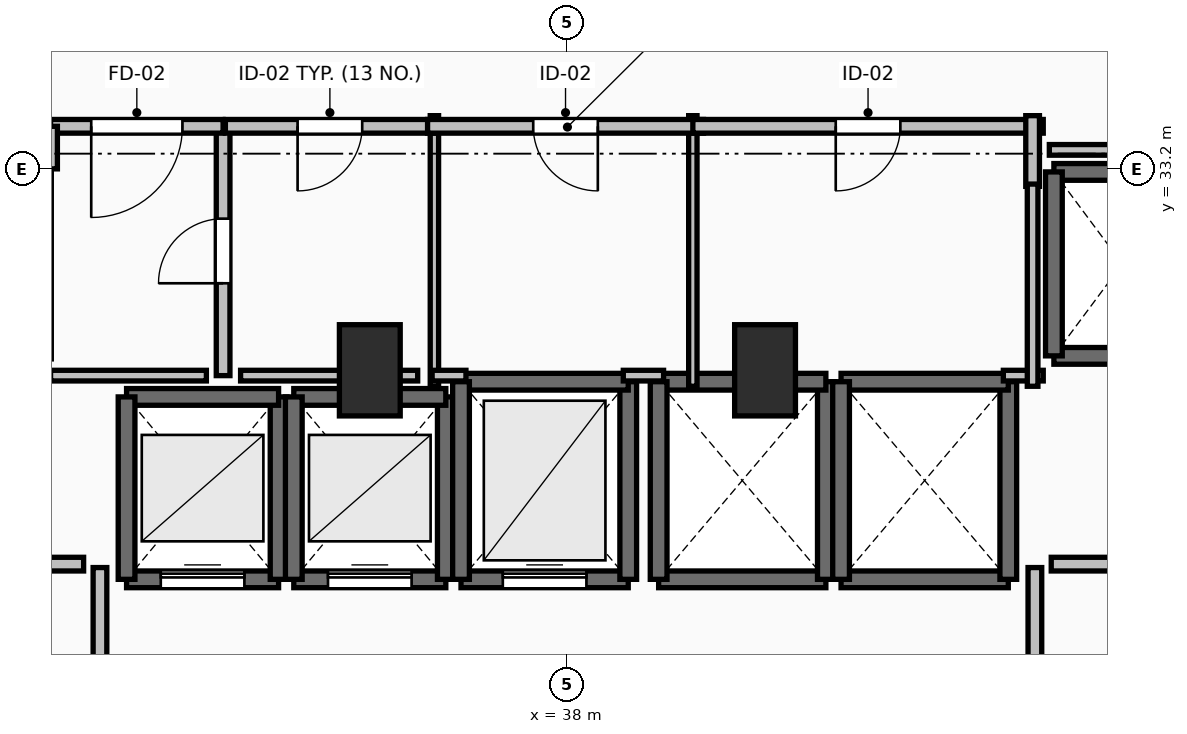
"""IFC4 building model, lengths in metres.
Left out: names, types, materials, properties, quantities, classifications, styles, units other than length and angle.
Written with IfcOpenShell. Run it as: python <this file> out.ifc"""

import sys

from ifc_helpers import new_model, si_unit, direction, frame, frame_2d, origin, origin_2d, place, context, subcontext, project, spatial, rectangle, extrude, element, fill, save


model = new_model("IFC4")
c1 = context("Model", 3, precision=1e-05, world=origin(), true_north=direction((0.0, 1.0)))
c2 = subcontext(c1, "Body", "Model", "MODEL_VIEW")
j1 = project(units=[si_unit("LENGTHUNIT", "METRE"), si_unit("PLANEANGLEUNIT", "RADIAN")], contexts=[c1])
p1 = place(None, origin())
s1 = spatial("IfcSite", under=j1, at=p1, CompositionType="ELEMENT")
p2 = place(p1, origin())
s2 = spatial("IfcBuilding", under=s1, at=p2, CompositionType="ELEMENT")
p3 = place(p2, frame((0.0, 0.0, 82.3)))
s3 = spatial("IfcBuildingStorey", under=s2, at=p3, CompositionType="ELEMENT", Elevation=82.3)
for number, where, z_axis, x_axis in (
    (1, (35.4, 30.55, 0.0), (0.0, 0.0, 1.0), (1.0, 0.0, 0.0)),
    (2, (40.6, 30.55, 0.0), (0.0, 0.0, 1.0), (1.0, 0.0, 0.0)),
):
    element("IfcColumn", number, at=place(p3, frame(where, z_axis=z_axis, x_axis=x_axis)), inside=s3, PredefinedType="PILASTER", context=c2, shape_type="SweptSolid", body=[
        extrude(rectangle(XDim=0.8, YDim=1.2, at=origin_2d()), origin(), (0.0, 0.0, 1.0), 3.5),
    ])
p4 = place(p3, frame((32.2, 27.8, 0.0), z_axis=(0.0, 0.0, 1.0), x_axis=(1.0, 0.0, 0.0)))
e3 = element("IfcWall", 3, at=p4, inside=s3, PredefinedType="SOLIDWALL", context=c2, shape_type="SweptSolid", body=[
    extrude(rectangle(XDim=2.0, YDim=0.22, at=frame_2d((1.0, 0.0))), origin(), (0.0, 0.0, 1.0), 3.24),
])
p5 = place(p4, frame((0.45, 0.0, 0.0)))
e4 = element("IfcOpeningElement", 4, at=p5, cuts=e3, PredefinedType="OPENING", context=c2, shape_type="SweptSolid", body=[
    extrude(rectangle(XDim=1.1, YDim=2.2, at=frame_2d((0.55, 1.1))), frame((0.0, 0.125, 0.0), z_axis=(0.0, -1.0, 0.0), x_axis=(1.0, 0.0, 0.0)), (0.0, 0.0, 1.0), 0.25),
])
p6 = place(p3, frame((34.2, 27.8, 0.0), z_axis=(0.0, 0.0, 1.0), x_axis=(0.0, 1.0, 0.0)))
e5 = element("IfcWall", 5, at=p6, inside=s3, PredefinedType="SOLIDWALL", context=c2, shape_type="SweptSolid", body=[
    extrude(rectangle(XDim=2.4, YDim=0.22, at=frame_2d((1.2, 0.0))), origin(), (0.0, 0.0, 1.0), 3.24),
])
p7 = place(p3, frame((34.2, 30.2, 0.0), z_axis=(0.0, 0.0, 1.0), x_axis=(-1.0, 0.0, 0.0)))
e6 = element("IfcWall", 6, at=p7, inside=s3, PredefinedType="SOLIDWALL", context=c2, shape_type="SweptSolid", body=[
    extrude(rectangle(XDim=2.0, YDim=0.22, at=frame_2d((1.0, 0.0))), origin(), (0.0, 0.0, 1.0), 3.24),
])
p8 = place(p3, frame((32.2, 30.2, 0.0), z_axis=(0.0, 0.0, 1.0), x_axis=(0.0, -1.0, 0.0)))
e7 = element("IfcWall", 7, at=p8, inside=s3, PredefinedType="SOLIDWALL", context=c2, shape_type="SweptSolid", body=[
    extrude(rectangle(XDim=2.4, YDim=0.22, at=frame_2d((1.2, 0.0))), origin(), (0.0, 0.0, 1.0), 3.24),
])
p9 = place(p3, frame((34.4, 27.8, 0.0), z_axis=(0.0, 0.0, 1.0), x_axis=(1.0, 0.0, 0.0)))
e8 = element("IfcWall", 8, at=p9, inside=s3, PredefinedType="SOLIDWALL", context=c2, shape_type="SweptSolid", body=[
    extrude(rectangle(XDim=2.0, YDim=0.22, at=frame_2d((1.0, 0.0))), origin(), (0.0, 0.0, 1.0), 3.24),
])
p10 = place(p9, frame((0.45, 0.0, 0.0)))
e9 = element("IfcOpeningElement", 9, at=p10, cuts=e8, PredefinedType="OPENING", context=c2, shape_type="SweptSolid", body=[
    extrude(rectangle(XDim=1.1, YDim=2.2, at=frame_2d((0.55, 1.1))), frame((0.0, 0.125, 0.0), z_axis=(0.0, -1.0, 0.0), x_axis=(1.0, 0.0, 0.0)), (0.0, 0.0, 1.0), 0.25),
])
p11 = place(p3, frame((36.4, 27.8, 0.0), z_axis=(0.0, 0.0, 1.0), x_axis=(0.0, 1.0, 0.0)))
e10 = element("IfcWall", 10, at=p11, inside=s3, PredefinedType="SOLIDWALL", context=c2, shape_type="SweptSolid", body=[
    extrude(rectangle(XDim=2.4, YDim=0.22, at=frame_2d((1.2, 0.0))), origin(), (0.0, 0.0, 1.0), 3.24),
])
p12 = place(p3, frame((36.4, 30.2, 0.0), z_axis=(0.0, 0.0, 1.0), x_axis=(-1.0, 0.0, 0.0)))
e11 = element("IfcWall", 11, at=p12, inside=s3, PredefinedType="SOLIDWALL", context=c2, shape_type="SweptSolid", body=[
    extrude(rectangle(XDim=2.0, YDim=0.22, at=frame_2d((1.0, 0.0))), origin(), (0.0, 0.0, 1.0), 3.24),
])
p13 = place(p3, frame((34.4, 30.2, 0.0), z_axis=(0.0, 0.0, 1.0), x_axis=(0.0, -1.0, 0.0)))
e12 = element("IfcWall", 12, at=p13, inside=s3, PredefinedType="SOLIDWALL", context=c2, shape_type="SweptSolid", body=[
    extrude(rectangle(XDim=2.4, YDim=0.22, at=frame_2d((1.2, 0.0))), origin(), (0.0, 0.0, 1.0), 3.24),
])
p14 = place(p3, frame((36.6, 27.8, 0.0), z_axis=(0.0, 0.0, 1.0), x_axis=(1.0, 0.0, 0.0)))
e13 = element("IfcWall", 13, at=p14, inside=s3, PredefinedType="SOLIDWALL", context=c2, shape_type="SweptSolid", body=[
    extrude(rectangle(XDim=2.2, YDim=0.22, at=frame_2d((1.1, 0.0))), origin(), (0.0, 0.0, 1.0), 3.24),
])
p15 = place(p14, frame((0.55, 0.0, 0.0)))
e14 = element("IfcOpeningElement", 14, at=p15, cuts=e13, PredefinedType="OPENING", context=c2, shape_type="SweptSolid", body=[
    extrude(rectangle(XDim=1.1, YDim=2.2, at=frame_2d((0.55, 1.1))), frame((0.0, 0.125, 0.0), z_axis=(0.0, -1.0, 0.0), x_axis=(1.0, 0.0, 0.0)), (0.0, 0.0, 1.0), 0.25),
])
p16 = place(p3, frame((38.8, 27.8, 0.0), z_axis=(0.0, 0.0, 1.0), x_axis=(0.0, 1.0, 0.0)))
e15 = element("IfcWall", 15, at=p16, inside=s3, PredefinedType="SOLIDWALL", context=c2, shape_type="SweptSolid", body=[
    extrude(rectangle(XDim=2.6, YDim=0.22, at=frame_2d((1.3, 0.0))), origin(), (0.0, 0.0, 1.0), 3.24),
])
p17 = place(p3, frame((38.8, 30.4, 0.0), z_axis=(0.0, 0.0, 1.0), x_axis=(-1.0, 0.0, 0.0)))
e16 = element("IfcWall", 16, at=p17, inside=s3, PredefinedType="SOLIDWALL", context=c2, shape_type="SweptSolid", body=[
    extrude(rectangle(XDim=2.2, YDim=0.22, at=frame_2d((1.1, 0.0))), origin(), (0.0, 0.0, 1.0), 3.24),
])
p18 = place(p3, frame((36.6, 30.4, 0.0), z_axis=(0.0, 0.0, 1.0), x_axis=(0.0, -1.0, 0.0)))
e17 = element("IfcWall", 17, at=p18, inside=s3, PredefinedType="SOLIDWALL", context=c2, shape_type="SweptSolid", body=[
    extrude(rectangle(XDim=2.6, YDim=0.22, at=frame_2d((1.3, 0.0))), origin(), (0.0, 0.0, 1.0), 3.24),
])
p19 = place(p3, frame((39.2, 27.8, 0.0), z_axis=(0.0, 0.0, 1.0), x_axis=(1.0, 0.0, 0.0)))
e18 = element("IfcWall", 18, at=p19, inside=s3, PredefinedType="SOLIDWALL", context=c2, shape_type="SweptSolid", body=[
    extrude(rectangle(XDim=2.2, YDim=0.22, at=frame_2d((1.1, 0.0))), origin(), (0.0, 0.0, 1.0), 3.24),
])
p20 = place(p3, frame((41.4, 27.8, 0.0), z_axis=(0.0, 0.0, 1.0), x_axis=(0.0, 1.0, 0.0)))
e19 = element("IfcWall", 19, at=p20, inside=s3, PredefinedType="SOLIDWALL", context=c2, shape_type="SweptSolid", body=[
    extrude(rectangle(XDim=2.6, YDim=0.22, at=frame_2d((1.3, 0.0))), origin(), (0.0, 0.0, 1.0), 3.24),
])
p21 = place(p3, frame((41.4, 30.4, 0.0), z_axis=(0.0, 0.0, 1.0), x_axis=(-1.0, 0.0, 0.0)))
e20 = element("IfcWall", 20, at=p21, inside=s3, PredefinedType="SOLIDWALL", context=c2, shape_type="SweptSolid", body=[
    extrude(rectangle(XDim=2.2, YDim=0.22, at=frame_2d((1.1, 0.0))), origin(), (0.0, 0.0, 1.0), 3.24),
])
p22 = place(p3, frame((39.2, 30.4, 0.0), z_axis=(0.0, 0.0, 1.0), x_axis=(0.0, -1.0, 0.0)))
e21 = element("IfcWall", 21, at=p22, inside=s3, PredefinedType="SOLIDWALL", context=c2, shape_type="SweptSolid", body=[
    extrude(rectangle(XDim=2.6, YDim=0.22, at=frame_2d((1.3, 0.0))), origin(), (0.0, 0.0, 1.0), 3.24),
])
p23 = place(p3, frame((41.6, 27.8, 0.0), z_axis=(0.0, 0.0, 1.0), x_axis=(1.0, 0.0, 0.0)))
e22 = element("IfcWall", 22, at=p23, inside=s3, PredefinedType="SOLIDWALL", context=c2, shape_type="SweptSolid", body=[
    extrude(rectangle(XDim=2.2, YDim=0.22, at=frame_2d((1.1, 0.0))), origin(), (0.0, 0.0, 1.0), 3.24),
])
p24 = place(p3, frame((43.8, 27.8, 0.0), z_axis=(0.0, 0.0, 1.0), x_axis=(0.0, 1.0, 0.0)))
e23 = element("IfcWall", 23, at=p24, inside=s3, PredefinedType="SOLIDWALL", context=c2, shape_type="SweptSolid", body=[
    extrude(rectangle(XDim=2.6, YDim=0.22, at=frame_2d((1.3, 0.0))), origin(), (0.0, 0.0, 1.0), 3.24),
])
p25 = place(p3, frame((43.8, 30.4, 0.0), z_axis=(0.0, 0.0, 1.0), x_axis=(-1.0, 0.0, 0.0)))
e24 = element("IfcWall", 24, at=p25, inside=s3, PredefinedType="SOLIDWALL", context=c2, shape_type="SweptSolid", body=[
    extrude(rectangle(XDim=2.2, YDim=0.22, at=frame_2d((1.1, 0.0))), origin(), (0.0, 0.0, 1.0), 3.24),
])
p26 = place(p3, frame((41.6, 30.4, 0.0), z_axis=(0.0, 0.0, 1.0), x_axis=(0.0, -1.0, 0.0)))
e25 = element("IfcWall", 25, at=p26, inside=s3, PredefinedType="SOLIDWALL", context=c2, shape_type="SweptSolid", body=[
    extrude(rectangle(XDim=2.6, YDim=0.22, at=frame_2d((1.3, 0.0))), origin(), (0.0, 0.0, 1.0), 3.24),
])
for number, where, z_axis, x_axis in (
    (26, (44.4, 30.74, 0.0), (0.0, 0.0, 1.0), (1.0, 0.0, 0.0)),
    (27, (46.2, 33.16, 0.0), (0.0, 0.0, 1.0), (-1.0, 0.0, 0.0)),
):
    element("IfcWall", number, at=place(p3, frame(where, z_axis=z_axis, x_axis=x_axis)), inside=s3, PredefinedType="SOLIDWALL", context=c2, shape_type="SweptSolid", body=[
        extrude(rectangle(XDim=1.8, YDim=0.22, at=frame_2d((0.9, 0.0))), origin(), (0.0, 0.0, 1.0), 3.24),
    ])
p27 = place(p3, frame((44.4, 33.16, 0.0), z_axis=(0.0, 0.0, 1.0), x_axis=(0.0, -1.0, 0.0)))
e28 = element("IfcWall", 28, at=p27, inside=s3, PredefinedType="SOLIDWALL", context=c2, shape_type="SweptSolid", body=[
    extrude(rectangle(XDim=2.42, YDim=0.22, at=frame_2d((1.21, 0.0))), origin(), (0.0, 0.0, 1.0), 3.24),
])
p28 = place(p3, frame((31.85, 24.045, 0.0), z_axis=(0.0, 0.0, 1.0), x_axis=(0.0, 1.0, 0.0)))
e29 = element("IfcWall", 29, at=p28, inside=s3, PredefinedType="PARTITIONING", context=c2, shape_type="SweptSolid", body=[
    extrude(rectangle(XDim=3.91, YDim=0.18, at=frame_2d((1.955, 0.0))), origin(), (0.0, 0.0, 1.0), 3.24),
])
p29 = place(p28, frame((1.355, 0.0, 0.0)))
e30 = element("IfcOpeningElement", 30, at=p29, cuts=e29, PredefinedType="OPENING", context=c2, shape_type="SweptSolid", body=[
    extrude(rectangle(XDim=1.2, YDim=2.15, at=frame_2d((0.6, 1.075))), frame((0.0, 0.105, 0.0), z_axis=(0.0, -1.0, 0.0), x_axis=(1.0, 0.0, 0.0)), (0.0, 0.0, 1.0), 0.21),
])
p30 = place(p3, frame((44.15, 27.955, 0.0), z_axis=(0.0, 0.0, 1.0), x_axis=(0.0, -1.0, 0.0)))
e31 = element("IfcWall", 31, at=p30, inside=s3, PredefinedType="PARTITIONING", context=c2, shape_type="SweptSolid", body=[
    extrude(rectangle(XDim=3.91, YDim=0.18, at=frame_2d((1.955, 0.0))), origin(), (0.0, 0.0, 1.0), 3.24),
])
p31 = place(p30, frame((1.355, 0.0, 0.0)))
e32 = element("IfcOpeningElement", 32, at=p31, cuts=e31, PredefinedType="OPENING", context=c2, shape_type="SweptSolid", body=[
    extrude(rectangle(XDim=1.2, YDim=2.15, at=frame_2d((0.6, 1.075))), frame((0.0, 0.105, 0.0), z_axis=(0.0, -1.0, 0.0), x_axis=(1.0, 0.0, 0.0)), (0.0, 0.0, 1.0), 0.21),
])
p32 = place(p3, frame((33.47, 30.48, 0.0), z_axis=(0.0, 0.0, 1.0), x_axis=(0.0, 1.0, 0.0)))
e33 = element("IfcWall", 33, at=p32, inside=s3, PredefinedType="PARTITIONING", context=c2, shape_type="SweptSolid", body=[
    extrude(rectangle(XDim=3.28, YDim=0.18, at=frame_2d((1.64, 0.0))), origin(), (0.0, 0.0, 1.0), 3.24),
])
p33 = place(p32, frame((1.215, 0.0, 0.0)))
e34 = element("IfcOpeningElement", 34, at=p33, cuts=e33, PredefinedType="OPENING", context=c2, shape_type="SweptSolid", body=[
    extrude(rectangle(XDim=0.85, YDim=2.1, at=frame_2d((0.425, 1.05))), frame((0.0, 0.105, 0.0), z_axis=(0.0, -1.0, 0.0), x_axis=(1.0, 0.0, 0.0)), (0.0, 0.0, 1.0), 0.21),
])
p34 = place(p3, frame((33.47, 33.76, 0.0), z_axis=(0.0, 0.0, 1.0), x_axis=(-1.0, 0.0, 0.0)))
e35 = element("IfcWall", 35, at=p34, inside=s3, PredefinedType="PARTITIONING", context=c2, shape_type="SweptSolid", body=[
    extrude(rectangle(XDim=2.27, YDim=0.18, at=frame_2d((1.135, 0.0))), origin(), (0.0, 0.0, 1.0), 3.24),
])
p35 = place(p34, frame((0.535, 0.0, 0.0)))
e36 = element("IfcOpeningElement", 36, at=p35, cuts=e35, PredefinedType="OPENING", context=c2, shape_type="SweptSolid", body=[
    extrude(rectangle(XDim=1.2, YDim=2.15, at=frame_2d((0.6, 1.075))), frame((0.0, 0.105, 0.0), z_axis=(0.0, -1.0, 0.0), x_axis=(1.0, 0.0, 0.0)), (0.0, 0.0, 1.0), 0.21),
])
p36 = place(p3, frame((31.2, 33.76, 0.0), z_axis=(0.0, 0.0, 1.0), x_axis=(0.0, -1.0, 0.0)))
e37 = element("IfcWall", 37, at=p36, inside=s3, PredefinedType="PARTITIONING", context=c2, shape_type="SweptSolid", body=[
    extrude(rectangle(XDim=0.56, YDim=0.18, at=frame_2d((0.28, 0.0))), origin(), (0.0, 0.0, 1.0), 3.24),
])
p37 = place(p3, frame((36.25, 30.34, 0.0), z_axis=(0.0, 0.0, 1.0), x_axis=(0.0, 1.0, 0.0)))
e38 = element("IfcWall", 38, at=p37, inside=s3, PredefinedType="PARTITIONING", context=c2, shape_type="SweptSolid", body=[
    extrude(rectangle(XDim=3.56, YDim=0.11, at=frame_2d((1.78, 0.0))), origin(), (0.0, 0.0, 1.0), 2.432),
])
p38 = place(p3, frame((36.25, 33.76, 0.0), z_axis=(0.0, 0.0, 1.0), x_axis=(-1.0, 0.0, 0.0)))
e39 = element("IfcWall", 39, at=p38, inside=s3, PredefinedType="PARTITIONING", context=c2, shape_type="SweptSolid", body=[
    extrude(rectangle(XDim=2.75, YDim=0.18, at=frame_2d((1.375, 0.0))), origin(), (0.0, 0.0, 1.0), 3.24),
])
p39 = place(p38, frame((0.95, 0.0, 0.0)))
e40 = element("IfcOpeningElement", 40, at=p39, cuts=e39, PredefinedType="OPENING", context=c2, shape_type="SweptSolid", body=[
    extrude(rectangle(XDim=0.85, YDim=2.1, at=frame_2d((0.425, 1.05))), frame((0.0, 0.105, 0.0), z_axis=(0.0, -1.0, 0.0), x_axis=(1.0, 0.0, 0.0)), (0.0, 0.0, 1.0), 0.21),
])
p40 = place(p3, frame((39.65, 30.34, 0.0), z_axis=(0.0, 0.0, 1.0), x_axis=(0.0, 1.0, 0.0)))
e41 = element("IfcWall", 41, at=p40, inside=s3, PredefinedType="PARTITIONING", context=c2, shape_type="SweptSolid", body=[
    extrude(rectangle(XDim=3.56, YDim=0.11, at=frame_2d((1.78, 0.0))), origin(), (0.0, 0.0, 1.0), 2.432),
])
p41 = place(p3, frame((39.79, 33.76, 0.0), z_axis=(0.0, 0.0, 1.0), x_axis=(-1.0, 0.0, 0.0)))
e42 = element("IfcWall", 42, at=p41, inside=s3, PredefinedType="PARTITIONING", context=c2, shape_type="SweptSolid", body=[
    extrude(rectangle(XDim=3.63, YDim=0.18, at=frame_2d((1.815, 0.0))), origin(), (0.0, 0.0, 1.0), 3.24),
])
p42 = place(p41, frame((1.39, 0.0, 0.0)))
e43 = element("IfcOpeningElement", 43, at=p42, cuts=e42, PredefinedType="OPENING", context=c2, shape_type="SweptSolid", body=[
    extrude(rectangle(XDim=0.85, YDim=2.1, at=frame_2d((0.425, 1.05))), frame((0.0, 0.105, 0.0), z_axis=(0.0, -1.0, 0.0), x_axis=(1.0, 0.0, 0.0)), (0.0, 0.0, 1.0), 0.21),
])
p43 = place(p3, frame((44.26, 33.76, 0.0), z_axis=(0.0, 0.0, 1.0), x_axis=(-1.0, 0.0, 0.0)))
e44 = element("IfcWall", 44, at=p43, inside=s3, PredefinedType="PARTITIONING", context=c2, shape_type="SweptSolid", body=[
    extrude(rectangle(XDim=4.61, YDim=0.18, at=frame_2d((2.305, 0.0))), origin(), (0.0, 0.0, 1.0), 3.24),
])
p44 = place(p43, frame((1.88, 0.0, 0.0)))
e45 = element("IfcOpeningElement", 45, at=p44, cuts=e44, PredefinedType="OPENING", context=c2, shape_type="SweptSolid", body=[
    extrude(rectangle(XDim=0.85, YDim=2.1, at=frame_2d((0.425, 1.05))), frame((0.0, 0.105, 0.0), z_axis=(0.0, -1.0, 0.0), x_axis=(1.0, 0.0, 0.0)), (0.0, 0.0, 1.0), 0.21),
])
p45 = place(p3, frame((44.12, 32.97, 0.0), z_axis=(0.0, 0.0, 1.0), x_axis=(0.0, 1.0, 0.0)))
e46 = element("IfcWall", 46, at=p45, inside=s3, PredefinedType="PARTITIONING", context=c2, shape_type="SweptSolid", body=[
    extrude(rectangle(XDim=0.93, YDim=0.18, at=frame_2d((0.465, 0.0))), origin(), (0.0, 0.0, 1.0), 3.24),
])
for number, where, z_axis, x_axis in (
    (47, (31.635, 28.0, 0.0), (0.0, 0.0, 1.0), (-1.0, 0.0, 0.0)),
    (48, (45.28, 28.0, 0.0), (0.0, 0.0, 1.0), (-1.0, 0.0, 0.0)),
):
    element("IfcWall", number, at=place(p3, frame(where, z_axis=z_axis, x_axis=x_axis)), inside=s3, PredefinedType="PARTITIONING", context=c2, shape_type="SweptSolid", body=[
        extrude(rectangle(XDim=0.915, YDim=0.18, at=frame_2d((0.458, 0.0))), origin(), (0.0, 0.0, 1.0), 3.24),
    ])
p46 = place(p3, frame((31.2, 30.48, 0.0), z_axis=(0.0, 0.0, 1.0), x_axis=(1.0, 0.0, 0.0)))
e49 = element("IfcWall", 49, at=p46, inside=s3, PredefinedType="PARTITIONING", context=c2, shape_type="SweptSolid", body=[
    extrude(rectangle(XDim=2.05, YDim=0.14, at=frame_2d((1.025, 0.0))), origin(), (0.0, 0.0, 1.0), 3.24),
])
p47 = place(p3, frame((33.7, 30.48, 0.0), z_axis=(0.0, 0.0, 1.0), x_axis=(1.0, 0.0, 0.0)))
e50 = element("IfcWall", 50, at=p47, inside=s3, PredefinedType="PARTITIONING", context=c2, shape_type="SweptSolid", body=[
    extrude(rectangle(XDim=2.33, YDim=0.14, at=frame_2d((1.165, 0.0))), origin(), (0.0, 0.0, 1.0), 2.432),
])
p48 = place(p3, frame((36.22, 30.48, 0.0), z_axis=(0.0, 0.0, 1.0), x_axis=(1.0, 0.0, 0.0)))
e51 = element("IfcWall", 51, at=p48, inside=s3, PredefinedType="PARTITIONING", context=c2, shape_type="SweptSolid", body=[
    extrude(rectangle(XDim=0.445, YDim=0.14, at=frame_2d((0.223, 0.0))), origin(), (0.0, 0.0, 1.0), 2.432),
])
p49 = place(p3, frame((38.735, 30.48, 0.0), z_axis=(0.0, 0.0, 1.0), x_axis=(1.0, 0.0, 0.0)))
e52 = element("IfcWall", 52, at=p49, inside=s3, PredefinedType="PARTITIONING", context=c2, shape_type="SweptSolid", body=[
    extrude(rectangle(XDim=0.53, YDim=0.14, at=frame_2d((0.265, 0.0))), origin(), (0.0, 0.0, 1.0), 2.432),
])
p50 = place(p3, frame((43.735, 30.48, 0.0), z_axis=(0.0, 0.0, 1.0), x_axis=(1.0, 0.0, 0.0)))
e53 = element("IfcWall", 53, at=p50, inside=s3, PredefinedType="PARTITIONING", context=c2, shape_type="SweptSolid", body=[
    extrude(rectangle(XDim=0.525, YDim=0.14, at=frame_2d((0.262, 0.0))), origin(), (0.0, 0.0, 1.0), 3.24),
])
p51 = place(p3, frame((44.12, 30.34, 0.0), z_axis=(0.0, 0.0, 1.0), x_axis=(0.0, 1.0, 0.0)))
e54 = element("IfcWall", 54, at=p51, inside=s3, PredefinedType="PARTITIONING", context=c2, shape_type="SweptSolid", body=[
    extrude(rectangle(XDim=2.66, YDim=0.14, at=frame_2d((1.33, 0.0))), origin(), (0.0, 0.0, 1.0), 3.24),
])
p52 = place(p3, frame((44.34, 33.45, 0.0), z_axis=(0.0, 0.0, 1.0), x_axis=(1.0, 0.0, 0.0)))
e55 = element("IfcWall", 55, at=p52, inside=s3, PredefinedType="PARTITIONING", context=c2, shape_type="SweptSolid", body=[
    extrude(rectangle(XDim=4.21, YDim=0.14, at=frame_2d((2.105, 0.0))), origin(), (0.0, 0.0, 1.0), 2.432),
])
p53 = place(p5, origin())
e56 = element("IfcDoor", 56, at=p53, inside=s3, OperationType="SLIDING_TO_LEFT", PredefinedType="DOOR", context=c2, shape_type="SweptSolid", body=[
    extrude(rectangle(XDim=1.1, YDim=2.2, at=frame_2d((0.55, 1.1))), frame((0.0, 0.025, 0.0), z_axis=(0.0, -1.0, 0.0), x_axis=(1.0, 0.0, 0.0)), (0.0, 0.0, 1.0), 0.05),
])
fill(e4, e56)
p54 = place(p10, origin())
e57 = element("IfcDoor", 57, at=p54, inside=s3, OperationType="SLIDING_TO_LEFT", PredefinedType="DOOR", context=c2, shape_type="SweptSolid", body=[
    extrude(rectangle(XDim=1.1, YDim=2.2, at=frame_2d((0.55, 1.1))), frame((0.0, 0.025, 0.0), z_axis=(0.0, -1.0, 0.0), x_axis=(1.0, 0.0, 0.0)), (0.0, 0.0, 1.0), 0.05),
])
fill(e9, e57)
p55 = place(p15, origin())
e58 = element("IfcDoor", 58, at=p55, inside=s3, OperationType="SLIDING_TO_LEFT", PredefinedType="DOOR", context=c2, shape_type="SweptSolid", body=[
    extrude(rectangle(XDim=1.1, YDim=2.2, at=frame_2d((0.55, 1.1))), frame((0.0, 0.025, 0.0), z_axis=(0.0, -1.0, 0.0), x_axis=(1.0, 0.0, 0.0)), (0.0, 0.0, 1.0), 0.05),
])
fill(e14, e58)
p56 = place(p33, origin())
e59 = element("IfcDoor", 59, at=p56, inside=s3, OperationType="SINGLE_SWING_LEFT", PredefinedType="DOOR", context=c2, shape_type="SweptSolid", body=[
    extrude(rectangle(XDim=0.85, YDim=2.1, at=frame_2d((0.425, 1.05))), frame((0.0, 0.025, 0.0), z_axis=(0.0, -1.0, 0.0), x_axis=(1.0, 0.0, 0.0)), (0.0, 0.0, 1.0), 0.05),
])
fill(e34, e59)
p57 = place(p35, origin())
e60 = element("IfcDoor", 60, at=p57, inside=s3, OperationType="SINGLE_SWING_RIGHT", PredefinedType="DOOR", context=c2, shape_type="SweptSolid", body=[
    extrude(rectangle(XDim=1.2, YDim=2.15, at=frame_2d((0.6, 1.075))), frame((0.0, 0.025, 0.0), z_axis=(0.0, -1.0, 0.0), x_axis=(1.0, 0.0, 0.0)), (0.0, 0.0, 1.0), 0.05),
])
fill(e36, e60)
p58 = place(p39, origin())
e61 = element("IfcDoor", 61, at=p58, inside=s3, OperationType="SINGLE_SWING_RIGHT", PredefinedType="DOOR", context=c2, shape_type="SweptSolid", body=[
    extrude(rectangle(XDim=0.85, YDim=2.1, at=frame_2d((0.425, 1.05))), frame((0.0, 0.025, 0.0), z_axis=(0.0, -1.0, 0.0), x_axis=(1.0, 0.0, 0.0)), (0.0, 0.0, 1.0), 0.05),
])
fill(e40, e61)
p59 = place(p42, origin())
e62 = element("IfcDoor", 62, at=p59, inside=s3, OperationType="SINGLE_SWING_LEFT", PredefinedType="DOOR", context=c2, shape_type="SweptSolid", body=[
    extrude(rectangle(XDim=0.85, YDim=2.1, at=frame_2d((0.425, 1.05))), frame((0.0, 0.025, 0.0), z_axis=(0.0, -1.0, 0.0), x_axis=(1.0, 0.0, 0.0)), (0.0, 0.0, 1.0), 0.05),
])
fill(e43, e62)
p60 = place(p44, origin())
e63 = element("IfcDoor", 63, at=p60, inside=s3, OperationType="SINGLE_SWING_RIGHT", PredefinedType="DOOR", context=c2, shape_type="SweptSolid", body=[
    extrude(rectangle(XDim=0.85, YDim=2.1, at=frame_2d((0.425, 1.05))), frame((0.0, 0.025, 0.0), z_axis=(0.0, -1.0, 0.0), x_axis=(1.0, 0.0, 0.0)), (0.0, 0.0, 1.0), 0.05),
])
fill(e45, e63)
save(model, sys.argv[1])
